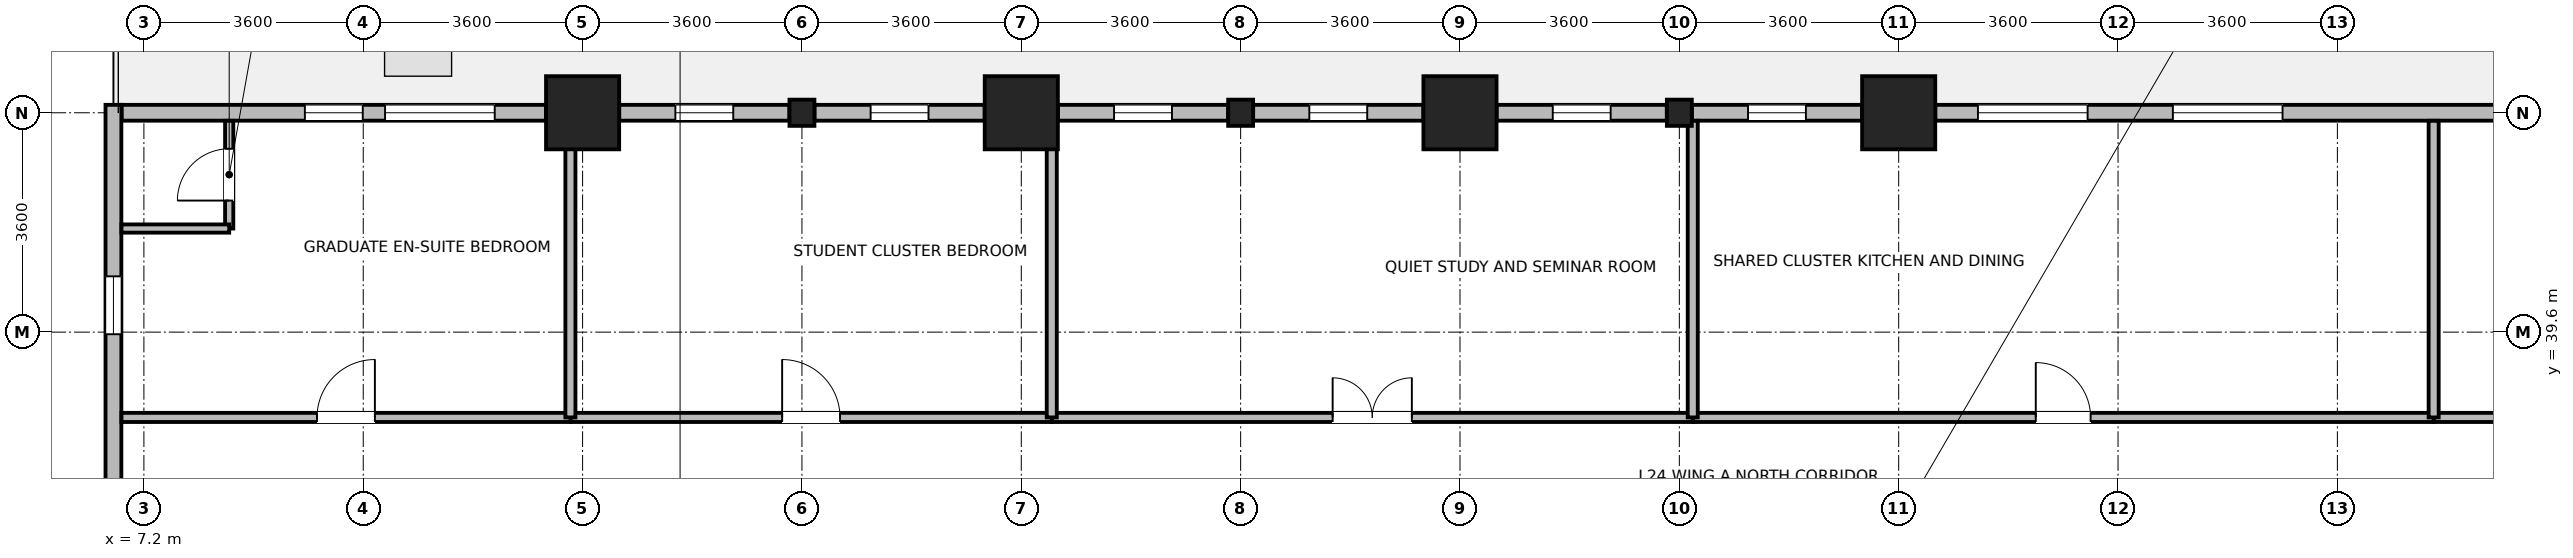
"""IFC4 building model, lengths in metres.
Left out: names, types, materials, properties, quantities, classifications, styles, units other than length and angle.
Written with IfcOpenShell. Run it as: python <this file> out.ifc"""

import sys

from ifc_helpers import new_model, si_unit, direction, frame, frame_2d, origin, origin_2d, place, context, subcontext, project, spatial, rectangle, i_section, extrude, source, transform, mapped, element, fill, save


model = new_model("IFC4")
c1 = context("Model", 3, precision=1e-05, world=origin(), true_north=direction((0.0, 1.0)))
c2 = subcontext(c1, "Body", "Model", "MODEL_VIEW")
j1 = project(units=[si_unit("LENGTHUNIT", "METRE"), si_unit("PLANEANGLEUNIT", "RADIAN")], contexts=[c1])
p1 = place(None, origin())
s1 = spatial("IfcSite", under=j1, at=p1, CompositionType="ELEMENT")
p2 = place(p1, origin())
s2 = spatial("IfcBuilding", under=s1, at=p2, CompositionType="ELEMENT")
p3 = place(p2, frame((0.0, 0.0, 97.1)))
s3 = spatial("IfcBuildingStorey", under=s2, at=p3, CompositionType="ELEMENT", Elevation=97.1)
m1 = source(origin(), c2, "Body", "SweptSolid", [
    extrude(rectangle(XDim=1.2, YDim=1.2, at=origin_2d()), origin(), (0.0, 0.0, 1.0), 3.7),
])
for number, where, z_axis, x_axis in (
    (1, (14.4, 43.2, 0.0), (0.0, 0.0, 1.0), (1.0, 0.0, 0.0)),
    (2, (21.6, 43.2, 0.0), (0.0, 0.0, 1.0), (1.0, 0.0, 0.0)),
    (3, (28.8, 43.2, 0.0), (0.0, 0.0, 1.0), (1.0, 0.0, 0.0)),
    (4, (36.0, 43.2, 0.0), (0.0, 0.0, 1.0), (1.0, 0.0, 0.0)),
):
    element("IfcColumn", number, at=place(p3, frame(where, z_axis=z_axis, x_axis=x_axis)), inside=s3, PredefinedType="COLUMN", context=c2, shape_type="MappedRepresentation", body=[
        mapped(m1, transform((0.0, 0.0, 0.0), x_axis=(1.0, 0.0, 0.0), y_axis=(0.0, 1.0, 0.0), z_axis=(0.0, 0.0, 1.0), scale=1.0)),
    ])
m2 = source(origin(), c2, "Body", "SweptSolid", [
    extrude(i_section(OverallWidth=0.409, OverallDepth=0.43, WebThickness=0.024, FlangeThickness=0.033, FilletRadius=0.015, at=origin_2d()), origin(), (0.0, 0.0, 1.0), 3.7),
])
for number, where, z_axis, x_axis in (
    (5, (18.0, 43.2, 0.0), (0.0, 0.0, 1.0), (1.0, 0.0, 0.0)),
    (6, (25.2, 43.2, 0.0), (0.0, 0.0, 1.0), (1.0, 0.0, 0.0)),
    (7, (32.4, 43.2, 0.0), (0.0, 0.0, 1.0), (1.0, 0.0, 0.0)),
):
    element("IfcColumn", number, at=place(p3, frame(where, z_axis=z_axis, x_axis=x_axis)), inside=s3, PredefinedType="COLUMN", context=c2, shape_type="MappedRepresentation", body=[
        mapped(m2, transform((0.0, 0.0, 0.0), x_axis=(1.0, 0.0, 0.0), y_axis=(0.0, 1.0, 0.0), z_axis=(0.0, 0.0, 1.0), scale=1.0)),
    ])
p4 = place(p3, frame((36.601, 43.2, 0.0), z_axis=(0.0, 0.0, 1.0), x_axis=(1.0, 0.0, 0.0)))
e8 = element("IfcWall", 8, at=p4, inside=s3, PredefinedType="STANDARD", context=c2, shape_type="SweptSolid", body=[
    extrude(rectangle(XDim=9.598, YDim=0.26, at=frame_2d((4.799, 0.0))), origin(), (0.0, 0.0, 1.0), 2.98),
])
p5 = place(p4, frame((0.7, 0.0, 0.85)))
e9 = element("IfcOpeningElement", 9, at=p5, cuts=e8, PredefinedType="OPENING", context=c2, shape_type="SweptSolid", body=[
    extrude(rectangle(XDim=1.8, YDim=1.85, at=frame_2d((0.9, 0.925))), frame((0.0, 0.14, 0.0), z_axis=(0.0, -1.0, 0.0), x_axis=(1.0, 0.0, 0.0)), (0.0, 0.0, 1.0), 0.28),
])
p6 = place(p4, frame((3.899, 0.0, 0.85)))
e10 = element("IfcOpeningElement", 10, at=p6, cuts=e8, PredefinedType="OPENING", context=c2, shape_type="SweptSolid", body=[
    extrude(rectangle(XDim=1.8, YDim=1.85, at=frame_2d((0.9, 0.925))), frame((0.0, 0.14, 0.0), z_axis=(0.0, -1.0, 0.0), x_axis=(1.0, 0.0, 0.0)), (0.0, 0.0, 1.0), 0.28),
])
p7 = place(p3, frame((32.605, 43.2, 0.0), z_axis=(0.0, 0.0, 1.0), x_axis=(1.0, 0.0, 0.0)))
e11 = element("IfcWall", 11, at=p7, inside=s3, PredefinedType="STANDARD", context=c2, shape_type="SweptSolid", body=[
    extrude(rectangle(XDim=2.793, YDim=0.26, at=frame_2d((1.397, 0.0))), origin(), (0.0, 0.0, 1.0), 2.98),
])
p8 = place(p7, frame((0.922, 0.0, 0.85)))
e12 = element("IfcOpeningElement", 12, at=p8, cuts=e11, PredefinedType="OPENING", context=c2, shape_type="SweptSolid", body=[
    extrude(rectangle(XDim=0.95, YDim=1.75, at=frame_2d((0.475, 0.875))), frame((0.0, 0.14, 0.0), z_axis=(0.0, -1.0, 0.0), x_axis=(1.0, 0.0, 0.0)), (0.0, 0.0, 1.0), 0.28),
])
p9 = place(p3, frame((29.401, 43.2, 0.0), z_axis=(0.0, 0.0, 1.0), x_axis=(1.0, 0.0, 0.0)))
e13 = element("IfcWall", 13, at=p9, inside=s3, PredefinedType="STANDARD", context=c2, shape_type="SweptSolid", body=[
    extrude(rectangle(XDim=2.794, YDim=0.26, at=frame_2d((1.397, 0.0))), origin(), (0.0, 0.0, 1.0), 2.98),
])
p10 = place(p9, frame((0.922, 0.0, 0.85)))
e14 = element("IfcOpeningElement", 14, at=p10, cuts=e13, PredefinedType="OPENING", context=c2, shape_type="SweptSolid", body=[
    extrude(rectangle(XDim=0.95, YDim=1.75, at=frame_2d((0.475, 0.875))), frame((0.0, 0.14, 0.0), z_axis=(0.0, -1.0, 0.0), x_axis=(1.0, 0.0, 0.0)), (0.0, 0.0, 1.0), 0.28),
])
p11 = place(p3, frame((25.406, 43.2, 0.0), z_axis=(0.0, 0.0, 1.0), x_axis=(1.0, 0.0, 0.0)))
e15 = element("IfcWall", 15, at=p11, inside=s3, PredefinedType="STANDARD", context=c2, shape_type="SweptSolid", body=[
    extrude(rectangle(XDim=2.793, YDim=0.26, at=frame_2d((1.397, 0.0))), origin(), (0.0, 0.0, 1.0), 2.98),
])
p12 = place(p11, frame((0.922, 0.0, 0.85)))
e16 = element("IfcOpeningElement", 16, at=p12, cuts=e15, PredefinedType="OPENING", context=c2, shape_type="SweptSolid", body=[
    extrude(rectangle(XDim=0.95, YDim=1.75, at=frame_2d((0.475, 0.875))), frame((0.0, 0.14, 0.0), z_axis=(0.0, -1.0, 0.0), x_axis=(1.0, 0.0, 0.0)), (0.0, 0.0, 1.0), 0.28),
])
p13 = place(p3, frame((22.201, 43.2, 0.0), z_axis=(0.0, 0.0, 1.0), x_axis=(1.0, 0.0, 0.0)))
e17 = element("IfcWall", 17, at=p13, inside=s3, PredefinedType="STANDARD", context=c2, shape_type="SweptSolid", body=[
    extrude(rectangle(XDim=2.793, YDim=0.26, at=frame_2d((1.397, 0.0))), origin(), (0.0, 0.0, 1.0), 2.98),
])
p14 = place(p13, frame((0.922, 0.0, 0.85)))
e18 = element("IfcOpeningElement", 18, at=p14, cuts=e17, PredefinedType="OPENING", context=c2, shape_type="SweptSolid", body=[
    extrude(rectangle(XDim=0.95, YDim=1.75, at=frame_2d((0.475, 0.875))), frame((0.0, 0.14, 0.0), z_axis=(0.0, -1.0, 0.0), x_axis=(1.0, 0.0, 0.0)), (0.0, 0.0, 1.0), 0.28),
])
p15 = place(p3, frame((18.206, 43.2, 0.0), z_axis=(0.0, 0.0, 1.0), x_axis=(1.0, 0.0, 0.0)))
e19 = element("IfcWall", 19, at=p15, inside=s3, PredefinedType="STANDARD", context=c2, shape_type="SweptSolid", body=[
    extrude(rectangle(XDim=2.793, YDim=0.26, at=frame_2d((1.397, 0.0))), origin(), (0.0, 0.0, 1.0), 2.98),
])
p16 = place(p15, frame((0.922, 0.0, 0.85)))
e20 = element("IfcOpeningElement", 20, at=p16, cuts=e19, PredefinedType="OPENING", context=c2, shape_type="SweptSolid", body=[
    extrude(rectangle(XDim=0.95, YDim=1.75, at=frame_2d((0.475, 0.875))), frame((0.0, 0.14, 0.0), z_axis=(0.0, -1.0, 0.0), x_axis=(1.0, 0.0, 0.0)), (0.0, 0.0, 1.0), 0.28),
])
p17 = place(p3, frame((15.001, 43.2, 0.0), z_axis=(0.0, 0.0, 1.0), x_axis=(1.0, 0.0, 0.0)))
e21 = element("IfcWall", 21, at=p17, inside=s3, PredefinedType="STANDARD", context=c2, shape_type="SweptSolid", body=[
    extrude(rectangle(XDim=2.793, YDim=0.26, at=frame_2d((1.397, 0.0))), origin(), (0.0, 0.0, 1.0), 2.98),
])
p18 = place(p17, frame((0.922, 0.0, 0.85)))
e22 = element("IfcOpeningElement", 22, at=p18, cuts=e21, PredefinedType="OPENING", context=c2, shape_type="SweptSolid", body=[
    extrude(rectangle(XDim=0.95, YDim=1.75, at=frame_2d((0.475, 0.875))), frame((0.0, 0.14, 0.0), z_axis=(0.0, -1.0, 0.0), x_axis=(1.0, 0.0, 0.0)), (0.0, 0.0, 1.0), 0.28),
])
p19 = place(p3, frame((6.835, 43.2, 0.0), z_axis=(0.0, 0.0, 1.0), x_axis=(1.0, 0.0, 0.0)))
e23 = element("IfcWall", 23, at=p19, inside=s3, PredefinedType="STANDARD", context=c2, shape_type="SweptSolid", body=[
    extrude(rectangle(XDim=6.964, YDim=0.26, at=frame_2d((3.482, 0.0))), origin(), (0.0, 0.0, 1.0), 3.43),
])
p20 = place(p19, frame((4.323, 0.0, 0.85)))
e24 = element("IfcOpeningElement", 24, at=p20, cuts=e23, PredefinedType="OPENING", context=c2, shape_type="SweptSolid", body=[
    extrude(rectangle(XDim=1.8, YDim=1.85, at=frame_2d((0.9, 0.925))), frame((0.0, 0.14, 0.0), z_axis=(0.0, -1.0, 0.0), x_axis=(1.0, 0.0, 0.0)), (0.0, 0.0, 1.0), 0.28),
])
p21 = place(p19, frame((3.007, 0.0, 0.85)))
e25 = element("IfcOpeningElement", 25, at=p21, cuts=e23, PredefinedType="OPENING", context=c2, shape_type="SweptSolid", body=[
    extrude(rectangle(XDim=0.95, YDim=1.75, at=frame_2d((0.475, 0.875))), frame((0.0, 0.14, 0.0), z_axis=(0.0, -1.0, 0.0), x_axis=(1.0, 0.0, 0.0)), (0.0, 0.0, 1.0), 0.28),
])
p22 = place(p3, frame((6.7, 36.751, 0.0), z_axis=(0.0, 0.0, 1.0), x_axis=(0.0, 1.0, 0.0)))
e26 = element("IfcWall", 26, at=p22, inside=s3, PredefinedType="STANDARD", context=c2, shape_type="SweptSolid", body=[
    extrude(rectangle(XDim=6.579, YDim=0.26, at=frame_2d((3.29, 0.0))), origin(), (0.0, 0.0, 1.0), 3.43),
])
p23 = place(p22, frame((2.814, 0.0, 0.85)))
e27 = element("IfcOpeningElement", 27, at=p23, cuts=e26, PredefinedType="OPENING", context=c2, shape_type="SweptSolid", body=[
    extrude(rectangle(XDim=0.95, YDim=1.75, at=frame_2d((0.475, 0.875))), frame((0.0, 0.14, 0.0), z_axis=(0.0, -1.0, 0.0), x_axis=(1.0, 0.0, 0.0)), (0.0, 0.0, 1.0), 0.28),
])
p24 = place(p3, frame((8.6, 41.3, 0.0), z_axis=(0.0, 0.0, 1.0), x_axis=(0.0, 1.0, 0.0)))
e28 = element("IfcWall", 28, at=p24, inside=s3, PredefinedType="PARTITIONING", context=c2, shape_type="SweptSolid", body=[
    extrude(rectangle(XDim=1.768, YDim=0.135, at=frame_2d((0.884, 0.0))), origin(), (0.0, 0.0, 1.0), 3.43),
])
p25 = place(p24, frame((0.459, 0.0, 0.0)))
e29 = element("IfcOpeningElement", 29, at=p25, cuts=e28, PredefinedType="OPENING", context=c2, shape_type="SweptSolid", body=[
    extrude(rectangle(XDim=0.85, YDim=2.04, at=frame_2d((0.425, 1.02))), frame((0.0, 0.078, 0.0), z_axis=(0.0, -1.0, 0.0), x_axis=(1.0, 0.0, 0.0)), (0.0, 0.0, 1.0), 0.155),
])
p26 = place(p3, frame((6.832, 41.3, 0.0), z_axis=(0.0, 0.0, 1.0), x_axis=(1.0, 0.0, 0.0)))
e30 = element("IfcWall", 30, at=p26, inside=s3, PredefinedType="PARTITIONING", context=c2, shape_type="SweptSolid", body=[
    extrude(rectangle(XDim=1.768, YDim=0.135, at=frame_2d((0.884, 0.0))), origin(), (0.0, 0.0, 1.0), 3.43),
])
p27 = place(p3, frame((44.78, 38.2, 0.0), z_axis=(0.0, 0.0, 1.0), x_axis=(1.0, 0.0, 0.0)))
e31 = element("IfcWall", 31, at=p27, inside=s3, PredefinedType="PARTITIONING", context=c2, shape_type="SweptSolid", body=[
    extrude(rectangle(XDim=14.06, YDim=0.15, at=frame_2d((7.03, 0.0))), origin(), (0.0, 0.0, 1.0), 3.43),
])
p28 = place(p27, frame((6.38, 0.0, 0.0)))
e32 = element("IfcOpeningElement", 32, at=p28, cuts=e31, PredefinedType="OPENING", context=c2, shape_type="SweptSolid", body=[
    extrude(rectangle(XDim=1.3, YDim=2.12, at=frame_2d((0.65, 1.06))), frame((0.0, 0.085, 0.0), z_axis=(0.0, -1.0, 0.0), x_axis=(1.0, 0.0, 0.0)), (0.0, 0.0, 1.0), 0.17),
])
p29 = place(p3, frame((32.62, 38.2, 0.0), z_axis=(0.0, 0.0, 1.0), x_axis=(1.0, 0.0, 0.0)))
e33 = element("IfcWall", 33, at=p29, inside=s3, PredefinedType="PARTITIONING", context=c2, shape_type="SweptSolid", body=[
    extrude(rectangle(XDim=12.16, YDim=0.15, at=frame_2d((6.08, 0.0))), origin(), (0.0, 0.0, 1.0), 3.43),
])
p30 = place(p29, frame((5.63, 0.0, 0.0)))
e34 = element("IfcOpeningElement", 34, at=p30, cuts=e33, PredefinedType="OPENING", context=c2, shape_type="SweptSolid", body=[
    extrude(rectangle(XDim=0.9, YDim=2.08, at=frame_2d((0.45, 1.04))), frame((0.0, 0.085, 0.0), z_axis=(0.0, -1.0, 0.0), x_axis=(1.0, 0.0, 0.0)), (0.0, 0.0, 1.0), 0.17),
])
p31 = place(p3, frame((22.1, 38.2, 0.0), z_axis=(0.0, 0.0, 1.0), x_axis=(1.0, 0.0, 0.0)))
e35 = element("IfcWall", 35, at=p31, inside=s3, PredefinedType="PARTITIONING", context=c2, shape_type="SweptSolid", body=[
    extrude(rectangle(XDim=10.52, YDim=0.15, at=frame_2d((5.26, 0.0))), origin(), (0.0, 0.0, 1.0), 3.43),
])
p32 = place(p31, frame((4.61, 0.0, 0.0)))
e36 = element("IfcOpeningElement", 36, at=p32, cuts=e35, PredefinedType="OPENING", context=c2, shape_type="SweptSolid", body=[
    extrude(rectangle(XDim=1.3, YDim=2.12, at=frame_2d((0.65, 1.06))), frame((0.0, 0.085, 0.0), z_axis=(0.0, -1.0, 0.0), x_axis=(1.0, 0.0, 0.0)), (0.0, 0.0, 1.0), 0.17),
])
p33 = place(p3, frame((14.2, 38.2, 0.0), z_axis=(0.0, 0.0, 1.0), x_axis=(1.0, 0.0, 0.0)))
e37 = element("IfcWall", 37, at=p33, inside=s3, PredefinedType="PARTITIONING", context=c2, shape_type="SweptSolid", body=[
    extrude(rectangle(XDim=7.9, YDim=0.15, at=frame_2d((3.95, 0.0))), origin(), (0.0, 0.0, 1.0), 3.43),
])
p34 = place(p33, frame((3.475, 0.0, 0.0)))
e38 = element("IfcOpeningElement", 38, at=p34, cuts=e37, PredefinedType="OPENING", context=c2, shape_type="SweptSolid", body=[
    extrude(rectangle(XDim=0.95, YDim=2.1, at=frame_2d((0.475, 1.05))), frame((0.0, 0.085, 0.0), z_axis=(0.0, -1.0, 0.0), x_axis=(1.0, 0.0, 0.0)), (0.0, 0.0, 1.0), 0.17),
])
p35 = place(p3, frame((6.832, 38.2, 0.0), z_axis=(0.0, 0.0, 1.0), x_axis=(1.0, 0.0, 0.0)))
e39 = element("IfcWall", 39, at=p35, inside=s3, PredefinedType="PARTITIONING", context=c2, shape_type="SweptSolid", body=[
    extrude(rectangle(XDim=7.368, YDim=0.15, at=frame_2d((3.684, 0.0))), origin(), (0.0, 0.0, 1.0), 3.43),
])
p36 = place(p35, frame((3.209, 0.0, 0.0)))
e40 = element("IfcOpeningElement", 40, at=p36, cuts=e39, PredefinedType="OPENING", context=c2, shape_type="SweptSolid", body=[
    extrude(rectangle(XDim=0.95, YDim=2.1, at=frame_2d((0.475, 1.05))), frame((0.0, 0.085, 0.0), z_axis=(0.0, -1.0, 0.0), x_axis=(1.0, 0.0, 0.0)), (0.0, 0.0, 1.0), 0.17),
])
p37 = place(p3, frame((14.2, 38.2, 0.0), z_axis=(0.0, 0.0, 1.0), x_axis=(0.0, 1.0, 0.0)))
e41 = element("IfcWall", 41, at=p37, inside=s3, PredefinedType="PARTITIONING", context=c2, shape_type="SweptSolid", body=[
    extrude(rectangle(XDim=4.868, YDim=0.165, at=frame_2d((2.434, 0.0))), origin(), (0.0, 0.0, 1.0), 2.93),
])
p38 = place(p3, frame((22.1, 38.2, 0.0), z_axis=(0.0, 0.0, 1.0), x_axis=(0.0, 1.0, 0.0)))
e42 = element("IfcWall", 42, at=p38, inside=s3, PredefinedType="PARTITIONING", context=c2, shape_type="SweptSolid", body=[
    extrude(rectangle(XDim=4.868, YDim=0.165, at=frame_2d((2.434, 0.0))), origin(), (0.0, 0.0, 1.0), 3.43),
])
p39 = place(p3, frame((32.62, 38.2, 0.0), z_axis=(0.0, 0.0, 1.0), x_axis=(0.0, 1.0, 0.0)))
e43 = element("IfcWall", 43, at=p39, inside=s3, PredefinedType="PARTITIONING", context=c2, shape_type="SweptSolid", body=[
    extrude(rectangle(XDim=4.868, YDim=0.165, at=frame_2d((2.434, 0.0))), origin(), (0.0, 0.0, 1.0), 3.1),
])
p40 = place(p3, frame((44.78, 38.2, 0.0), z_axis=(0.0, 0.0, 1.0), x_axis=(0.0, 1.0, 0.0)))
e44 = element("IfcWall", 44, at=p40, inside=s3, PredefinedType="PARTITIONING", context=c2, shape_type="SweptSolid", body=[
    extrude(rectangle(XDim=4.868, YDim=0.165, at=frame_2d((2.434, 0.0))), origin(), (0.0, 0.0, 1.0), 3.43),
])
p41 = place(p5, origin())
e45 = element("IfcWindow", 45, at=p41, inside=s3, PartitioningType="SINGLE_PANEL", PredefinedType="WINDOW", context=c2, shape_type="SweptSolid", body=[
    extrude(rectangle(XDim=1.8, YDim=1.85, at=frame_2d((0.9, 0.925))), frame((0.0, 0.03, 0.0), z_axis=(0.0, -1.0, 0.0), x_axis=(1.0, 0.0, 0.0)), (0.0, 0.0, 1.0), 0.06),
])
fill(e9, e45)
p42 = place(p6, origin())
e46 = element("IfcWindow", 46, at=p42, inside=s3, PartitioningType="SINGLE_PANEL", PredefinedType="WINDOW", context=c2, shape_type="SweptSolid", body=[
    extrude(rectangle(XDim=1.8, YDim=1.85, at=frame_2d((0.9, 0.925))), frame((0.0, 0.03, 0.0), z_axis=(0.0, -1.0, 0.0), x_axis=(1.0, 0.0, 0.0)), (0.0, 0.0, 1.0), 0.06),
])
fill(e10, e46)
p43 = place(p8, origin())
e47 = element("IfcWindow", 47, at=p43, inside=s3, PartitioningType="SINGLE_PANEL", PredefinedType="WINDOW", context=c2, shape_type="SweptSolid", body=[
    extrude(rectangle(XDim=0.95, YDim=1.75, at=frame_2d((0.475, 0.875))), frame((0.0, 0.03, 0.0), z_axis=(0.0, -1.0, 0.0), x_axis=(1.0, 0.0, 0.0)), (0.0, 0.0, 1.0), 0.06),
])
fill(e12, e47)
p44 = place(p10, origin())
e48 = element("IfcWindow", 48, at=p44, inside=s3, PartitioningType="SINGLE_PANEL", PredefinedType="WINDOW", context=c2, shape_type="SweptSolid", body=[
    extrude(rectangle(XDim=0.95, YDim=1.75, at=frame_2d((0.475, 0.875))), frame((0.0, 0.03, 0.0), z_axis=(0.0, -1.0, 0.0), x_axis=(1.0, 0.0, 0.0)), (0.0, 0.0, 1.0), 0.06),
])
fill(e14, e48)
p45 = place(p12, origin())
e49 = element("IfcWindow", 49, at=p45, inside=s3, PartitioningType="SINGLE_PANEL", PredefinedType="WINDOW", context=c2, shape_type="SweptSolid", body=[
    extrude(rectangle(XDim=0.95, YDim=1.75, at=frame_2d((0.475, 0.875))), frame((0.0, 0.03, 0.0), z_axis=(0.0, -1.0, 0.0), x_axis=(1.0, 0.0, 0.0)), (0.0, 0.0, 1.0), 0.06),
])
fill(e16, e49)
p46 = place(p14, origin())
e50 = element("IfcWindow", 50, at=p46, inside=s3, PartitioningType="SINGLE_PANEL", PredefinedType="WINDOW", context=c2, shape_type="SweptSolid", body=[
    extrude(rectangle(XDim=0.95, YDim=1.75, at=frame_2d((0.475, 0.875))), frame((0.0, 0.03, 0.0), z_axis=(0.0, -1.0, 0.0), x_axis=(1.0, 0.0, 0.0)), (0.0, 0.0, 1.0), 0.06),
])
fill(e18, e50)
p47 = place(p16, origin())
e51 = element("IfcWindow", 51, at=p47, inside=s3, PartitioningType="SINGLE_PANEL", PredefinedType="WINDOW", context=c2, shape_type="SweptSolid", body=[
    extrude(rectangle(XDim=0.95, YDim=1.75, at=frame_2d((0.475, 0.875))), frame((0.0, 0.03, 0.0), z_axis=(0.0, -1.0, 0.0), x_axis=(1.0, 0.0, 0.0)), (0.0, 0.0, 1.0), 0.06),
])
fill(e20, e51)
p48 = place(p18, origin())
e52 = element("IfcWindow", 52, at=p48, inside=s3, PartitioningType="SINGLE_PANEL", PredefinedType="WINDOW", context=c2, shape_type="SweptSolid", body=[
    extrude(rectangle(XDim=0.95, YDim=1.75, at=frame_2d((0.475, 0.875))), frame((0.0, 0.03, 0.0), z_axis=(0.0, -1.0, 0.0), x_axis=(1.0, 0.0, 0.0)), (0.0, 0.0, 1.0), 0.06),
])
fill(e22, e52)
p49 = place(p20, origin())
e53 = element("IfcWindow", 53, at=p49, inside=s3, PartitioningType="SINGLE_PANEL", PredefinedType="WINDOW", context=c2, shape_type="SweptSolid", body=[
    extrude(rectangle(XDim=1.8, YDim=1.85, at=frame_2d((0.9, 0.925))), frame((0.0, 0.03, 0.0), z_axis=(0.0, -1.0, 0.0), x_axis=(1.0, 0.0, 0.0)), (0.0, 0.0, 1.0), 0.06),
])
fill(e24, e53)
p50 = place(p21, origin())
e54 = element("IfcWindow", 54, at=p50, inside=s3, PartitioningType="SINGLE_PANEL", PredefinedType="WINDOW", context=c2, shape_type="SweptSolid", body=[
    extrude(rectangle(XDim=0.95, YDim=1.75, at=frame_2d((0.475, 0.875))), frame((0.0, 0.03, 0.0), z_axis=(0.0, -1.0, 0.0), x_axis=(1.0, 0.0, 0.0)), (0.0, 0.0, 1.0), 0.06),
])
fill(e25, e54)
p51 = place(p23, origin())
e55 = element("IfcWindow", 55, at=p51, inside=s3, PartitioningType="SINGLE_PANEL", PredefinedType="WINDOW", context=c2, shape_type="SweptSolid", body=[
    extrude(rectangle(XDim=0.95, YDim=1.75, at=frame_2d((0.475, 0.875))), frame((0.0, 0.03, 0.0), z_axis=(0.0, -1.0, 0.0), x_axis=(1.0, 0.0, 0.0)), (0.0, 0.0, 1.0), 0.06),
])
fill(e27, e55)
p52 = place(p25, origin())
e56 = element("IfcDoor", 56, at=p52, inside=s3, OperationType="SINGLE_SWING_LEFT", PredefinedType="DOOR", context=c2, shape_type="SweptSolid", body=[
    extrude(rectangle(XDim=0.85, YDim=2.04, at=frame_2d((0.425, 1.02))), frame((0.0, 0.025, 0.0), z_axis=(0.0, -1.0, 0.0), x_axis=(1.0, 0.0, 0.0)), (0.0, 0.0, 1.0), 0.05),
])
fill(e29, e56)
p53 = place(p30, origin())
e57 = element("IfcDoor", 57, at=p53, inside=s3, OperationType="SINGLE_SWING_LEFT", PredefinedType="DOOR", context=c2, shape_type="SweptSolid", body=[
    extrude(rectangle(XDim=0.9, YDim=2.08, at=frame_2d((0.45, 1.04))), frame((0.0, 0.025, 0.0), z_axis=(0.0, -1.0, 0.0), x_axis=(1.0, 0.0, 0.0)), (0.0, 0.0, 1.0), 0.05),
])
fill(e34, e57)
p54 = place(p32, origin())
e58 = element("IfcDoor", 58, at=p54, inside=s3, OperationType="DOUBLE_DOOR_SINGLE_SWING", PredefinedType="DOOR", context=c2, shape_type="SweptSolid", body=[
    extrude(rectangle(XDim=1.3, YDim=2.12, at=frame_2d((0.65, 1.06))), frame((0.0, 0.025, 0.0), z_axis=(0.0, -1.0, 0.0), x_axis=(1.0, 0.0, 0.0)), (0.0, 0.0, 1.0), 0.05),
])
fill(e36, e58)
p55 = place(p34, origin())
e59 = element("IfcDoor", 59, at=p55, inside=s3, OperationType="SINGLE_SWING_LEFT", PredefinedType="DOOR", context=c2, shape_type="SweptSolid", body=[
    extrude(rectangle(XDim=0.95, YDim=2.1, at=frame_2d((0.475, 1.05))), frame((0.0, 0.025, 0.0), z_axis=(0.0, -1.0, 0.0), x_axis=(1.0, 0.0, 0.0)), (0.0, 0.0, 1.0), 0.05),
])
fill(e38, e59)
p56 = place(p36, origin())
e60 = element("IfcDoor", 60, at=p56, inside=s3, OperationType="SINGLE_SWING_RIGHT", PredefinedType="DOOR", context=c2, shape_type="SweptSolid", body=[
    extrude(rectangle(XDim=0.95, YDim=2.1, at=frame_2d((0.475, 1.05))), frame((0.0, 0.025, 0.0), z_axis=(0.0, -1.0, 0.0), x_axis=(1.0, 0.0, 0.0)), (0.0, 0.0, 1.0), 0.05),
])
fill(e40, e60)
save(model, sys.argv[1])
